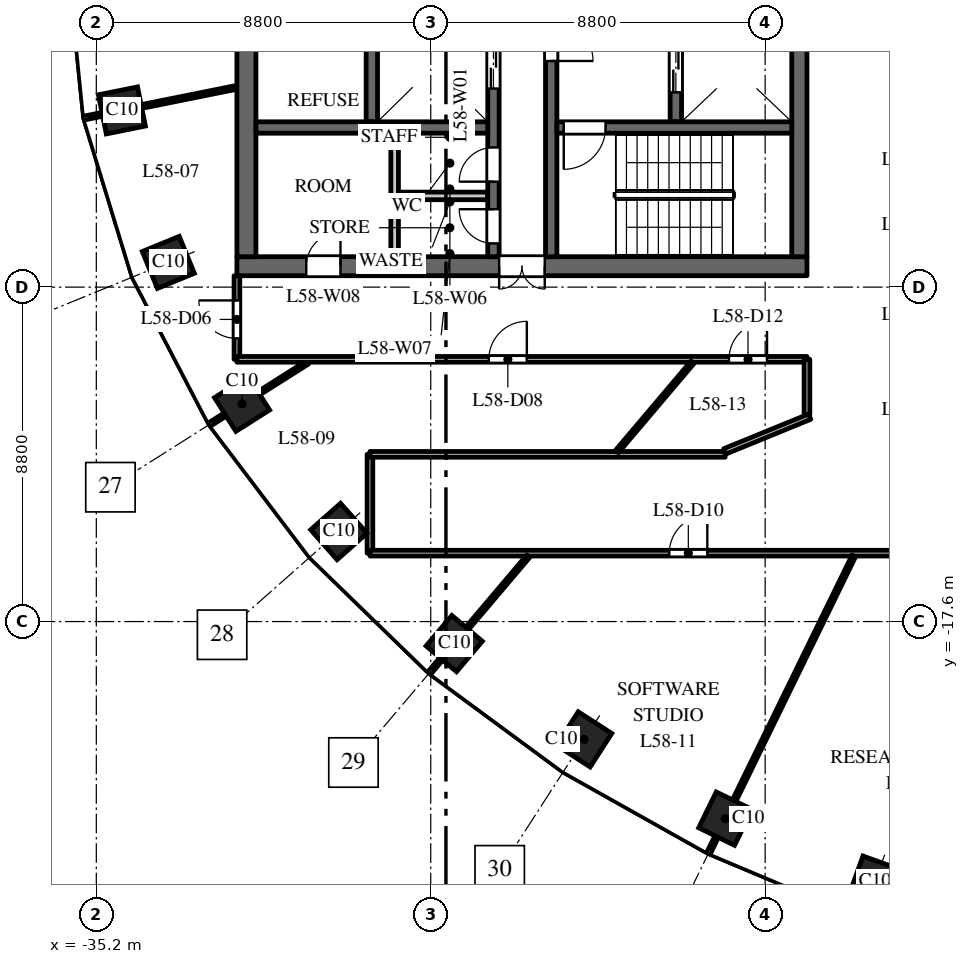
"""IFC4 building model, lengths in metres.
Left out: names, types, materials, properties, quantities, classifications, styles, units other than length and angle.
Written with IfcOpenShell. Run it as: python <this file> out.ifc"""

import sys

from ifc_helpers import new_model, si_unit, direction, frame, frame_2d, origin, origin_2d, place, context, subcontext, project, spatial, rectangle, extrude, element, fill, save


model = new_model("IFC4")
c1 = context("Model", 3, precision=1e-05, world=origin(), true_north=direction((0.0, 1.0)))
c2 = subcontext(c1, "Body", "Model", "MODEL_VIEW")
j1 = project(units=[si_unit("LENGTHUNIT", "METRE"), si_unit("PLANEANGLEUNIT", "RADIAN")], contexts=[c1])
p1 = place(None, origin())
s1 = spatial("IfcSite", under=j1, at=p1, CompositionType="ELEMENT")
p2 = place(p1, origin())
s2 = spatial("IfcBuilding", under=s1, at=p2, CompositionType="ELEMENT")
p3 = place(p2, frame((0.0, 0.0, 273.5)))
s3 = spatial("IfcBuildingStorey", under=s2, at=p3, CompositionType="ELEMENT", Elevation=273.5)
for number, where, z_axis, x_axis in (
    (1, (-34.527, -4.151, 0.0), (0.0, 0.0, 1.0), (0.197, -0.98, 0.0)),
    (2, (-33.305, -8.149, 0.0), (0.0, 0.0, 1.0), (0.379, -0.925, 0.0)),
    (3, (-31.365, -11.871, 0.0), (0.0, 0.0, 1.0), (0.535, -0.845, 0.0)),
    (4, (-28.819, -15.23, 0.0), (0.0, 0.0, 1.0), (0.663, -0.749, 0.0)),
    (5, (-25.783, -18.18, 0.0), (0.0, 0.0, 1.0), (0.763, -0.646, 0.0)),
    (6, (-22.362, -20.7, 0.0), (0.0, 0.0, 1.0), (0.84, -0.542, 0.0)),
    (7, (-18.646, -22.785, 0.0), (0.0, 0.0, 1.0), (0.898, -0.439, 0.0)),
    (8, (-14.709, -24.441, 0.0), (0.0, 0.0, 1.0), (0.941, -0.338, 0.0)),
):
    element("IfcColumn", number, at=place(p3, frame(where, z_axis=z_axis, x_axis=x_axis)), inside=s3, PredefinedType="COLUMN", context=c2, shape_type="SweptSolid", body=[
        extrude(rectangle(XDim=1.05, YDim=1.05, at=origin_2d()), origin(), (0.0, 0.0, 1.0), 4.0),
    ])
p4 = place(p3, frame((-16.5, -8.25, 0.0), z_axis=(0.0, 0.0, 1.0), x_axis=(-1.0, 0.0, 0.0)))
e9 = element("IfcWall", 9, at=p4, inside=s3, PredefinedType="SHEAR", context=c2, shape_type="SweptSolid", body=[
    extrude(rectangle(XDim=15.0, YDim=0.5, at=frame_2d((7.5, 0.0))), origin(), (0.0, 0.0, 1.0), 3.7),
])
p5 = place(p4, frame((6.9, 0.0, 0.0)))
e10 = element("IfcOpeningElement", 10, at=p5, cuts=e9, PredefinedType="OPENING", context=c2, shape_type="SweptSolid", body=[
    extrude(rectangle(XDim=1.2, YDim=2.1, at=frame_2d((0.6, 1.05))), frame((0.0, 0.26, 0.0), z_axis=(0.0, -1.0, 0.0), x_axis=(1.0, 0.0, 0.0)), (0.0, 0.0, 1.0), 0.52),
])
p6 = place(p4, frame((12.275, 0.0, 0.0)))
e11 = element("IfcOpeningElement", 11, at=p6, cuts=e9, PredefinedType="OPENING", context=c2, shape_type="SweptSolid", body=[
    extrude(rectangle(XDim=0.9, YDim=2.1, at=frame_2d((0.45, 1.05))), frame((0.0, 0.26, 0.0), z_axis=(0.0, -1.0, 0.0), x_axis=(1.0, 0.0, 0.0)), (0.0, 0.0, 1.0), 0.52),
])
p7 = place(p3, frame((-27.95, -4.45, 0.0), z_axis=(0.0, 0.0, 1.0), x_axis=(0.0, 1.0, 0.0)))
e12 = element("IfcWall", 12, at=p7, inside=s3, PredefinedType="SHEAR", context=c2, shape_type="SweptSolid", body=[
    extrude(rectangle(XDim=8.9, YDim=0.3, at=frame_2d((4.45, 0.0))), origin(), (0.0, 0.0, 1.0), 3.7),
])
p8 = place(p3, frame((-19.95, -4.45, 0.0), z_axis=(0.0, 0.0, 1.0), x_axis=(0.0, 1.0, 0.0)))
e13 = element("IfcWall", 13, at=p8, inside=s3, PredefinedType="SHEAR", context=c2, shape_type="SweptSolid", body=[
    extrude(rectangle(XDim=8.9, YDim=0.3, at=frame_2d((4.45, 0.0))), origin(), (0.0, 0.0, 1.0), 3.7),
])
p9 = place(p8, frame((0.775, 0.0, 0.0)))
e14 = element("IfcOpeningElement", 14, at=p9, cuts=e13, PredefinedType="OPENING", context=c2, shape_type="SweptSolid", body=[
    extrude(rectangle(XDim=1.2, YDim=2.1, at=frame_2d((0.6, 1.05))), frame((0.0, 0.16, 0.0), z_axis=(0.0, -1.0, 0.0), x_axis=(1.0, 0.0, 0.0)), (0.0, 0.0, 1.0), 0.32),
])
p10 = place(p8, frame((7.25, 0.0, 0.0)))
e15 = element("IfcOpeningElement", 15, at=p10, cuts=e13, PredefinedType="OPENING", context=c2, shape_type="SweptSolid", body=[
    extrude(rectangle(XDim=1.1, YDim=2.1, at=frame_2d((0.55, 1.05))), frame((0.0, 0.16, 0.0), z_axis=(0.0, -1.0, 0.0), x_axis=(1.0, 0.0, 0.0)), (0.0, 0.0, 1.0), 0.32),
])
p11 = place(p3, frame((-24.75, -8.0, 0.0), z_axis=(0.0, 0.0, 1.0), x_axis=(0.0, 1.0, 0.0)))
e16 = element("IfcWall", 16, at=p11, inside=s3, PredefinedType="SHEAR", context=c2, shape_type="SweptSolid", body=[
    extrude(rectangle(XDim=16.0, YDim=0.3, at=frame_2d((8.0, 0.0))), origin(), (0.0, 0.0, 1.0), 3.7),
])
p12 = place(p11, frame((4.425, 0.0, 0.0)))
e17 = element("IfcOpeningElement", 17, at=p12, cuts=e16, PredefinedType="OPENING", context=c2, shape_type="SweptSolid", body=[
    extrude(rectangle(XDim=1.1, YDim=2.1, at=frame_2d((0.55, 1.05))), frame((0.0, 0.16, 0.0), z_axis=(0.0, -1.0, 0.0), x_axis=(1.0, 0.0, 0.0)), (0.0, 0.0, 1.0), 0.32),
])
p13 = place(p11, frame((7.45, 0.0, 0.0)))
e18 = element("IfcOpeningElement", 18, at=p13, cuts=e16, PredefinedType="OPENING", context=c2, shape_type="SweptSolid", body=[
    extrude(rectangle(XDim=1.1, YDim=2.1, at=frame_2d((0.55, 1.05))), frame((0.0, 0.16, 0.0), z_axis=(0.0, -1.0, 0.0), x_axis=(1.0, 0.0, 0.0)), (0.0, 0.0, 1.0), 0.32),
])
p14 = place(p11, frame((10.475, 0.0, 0.0)))
e19 = element("IfcOpeningElement", 19, at=p14, cuts=e16, PredefinedType="OPENING", context=c2, shape_type="SweptSolid", body=[
    extrude(rectangle(XDim=1.1, YDim=2.1, at=frame_2d((0.55, 1.05))), frame((0.0, 0.16, 0.0), z_axis=(0.0, -1.0, 0.0), x_axis=(1.0, 0.0, 0.0)), (0.0, 0.0, 1.0), 0.32),
])
p15 = place(p11, frame((13.75, 0.0, 0.0)))
e20 = element("IfcOpeningElement", 20, at=p15, cuts=e16, PredefinedType="OPENING", context=c2, shape_type="SweptSolid", body=[
    extrude(rectangle(XDim=0.9, YDim=2.1, at=frame_2d((0.45, 1.05))), frame((0.0, 0.16, 0.0), z_axis=(0.0, -1.0, 0.0), x_axis=(1.0, 0.0, 0.0)), (0.0, 0.0, 1.0), 0.32),
])
p16 = place(p11, frame((1.975, 0.0, 0.0)))
e21 = element("IfcOpeningElement", 21, at=p16, cuts=e16, PredefinedType="OPENING", context=c2, shape_type="SweptSolid", body=[
    extrude(rectangle(XDim=0.9, YDim=2.1, at=frame_2d((0.45, 1.05))), frame((0.0, 0.16, 0.0), z_axis=(0.0, -1.0, 0.0), x_axis=(1.0, 0.0, 0.0)), (0.0, 0.0, 1.0), 0.32),
])
p17 = place(p11, frame((0.35, 0.0, 0.0)))
e22 = element("IfcOpeningElement", 22, at=p17, cuts=e16, PredefinedType="OPENING", context=c2, shape_type="SweptSolid", body=[
    extrude(rectangle(XDim=0.9, YDim=2.1, at=frame_2d((0.45, 1.05))), frame((0.0, 0.16, 0.0), z_axis=(0.0, -1.0, 0.0), x_axis=(1.0, 0.0, 0.0)), (0.0, 0.0, 1.0), 0.32),
])
p18 = place(p3, frame((-16.7, -8.0, 0.0), z_axis=(0.0, 0.0, 1.0), x_axis=(0.0, 1.0, 0.0)))
e23 = element("IfcWall", 23, at=p18, inside=s3, PredefinedType="SHEAR", context=c2, shape_type="SweptSolid", body=[
    extrude(rectangle(XDim=16.0, YDim=0.4, at=frame_2d((8.0, 0.0))), origin(), (0.0, 0.0, 1.0), 3.7),
])
p19 = place(p3, frame((-31.25, -8.0, 0.0), z_axis=(0.0, 0.0, 1.0), x_axis=(0.0, 1.0, 0.0)))
e24 = element("IfcWall", 24, at=p19, inside=s3, PredefinedType="SHEAR", context=c2, shape_type="SweptSolid", body=[
    extrude(rectangle(XDim=16.0, YDim=0.5, at=frame_2d((8.0, 0.0))), origin(), (0.0, 0.0, 1.0), 3.7),
])
p20 = place(p3, frame((-27.35, -8.0, 0.0), z_axis=(0.0, 0.0, 1.0), x_axis=(0.0, 1.0, 0.0)))
e25 = element("IfcWall", 25, at=p20, inside=s3, PredefinedType="PARTITIONING", context=c2, shape_type="SweptSolid", body=[
    extrude(rectangle(XDim=3.25, YDim=0.2, at=frame_2d((1.625, 0.0))), origin(), (0.0, 0.0, 1.0), 3.7),
])
p21 = place(p3, frame((-24.9, -6.4, 0.0), z_axis=(0.0, 0.0, 1.0), x_axis=(-1.0, 0.0, 0.0)))
e26 = element("IfcWall", 26, at=p21, inside=s3, PredefinedType="PARTITIONING", context=c2, shape_type="SweptSolid", body=[
    extrude(rectangle(XDim=2.35, YDim=0.2, at=frame_2d((1.175, 0.0))), origin(), (0.0, 0.0, 1.0), 3.7),
])
p22 = place(p3, frame((-24.9, -4.6, 0.0), z_axis=(0.0, 0.0, 1.0), x_axis=(-1.0, 0.0, 0.0)))
e27 = element("IfcWall", 27, at=p22, inside=s3, PredefinedType="SHEAR", context=c2, shape_type="SweptSolid", body=[
    extrude(rectangle(XDim=6.1, YDim=0.3, at=frame_2d((3.05, 0.0))), origin(), (0.0, 0.0, 1.0), 3.7),
])
p23 = place(p3, frame((-23.23, -8.0, 0.0), z_axis=(0.0, 0.0, 1.0), x_axis=(0.0, 1.0, 0.0)))
e28 = element("IfcWall", 28, at=p23, inside=s3, PredefinedType="SHEAR", context=c2, shape_type="SweptSolid", body=[
    extrude(rectangle(XDim=7.875, YDim=0.3, at=frame_2d((3.938, 0.0))), origin(), (0.0, 0.0, 1.0), 3.7),
])
p24 = place(p23, frame((5.15, 0.0, 0.0)))
e29 = element("IfcOpeningElement", 29, at=p24, cuts=e28, PredefinedType="OPENING", context=c2, shape_type="SweptSolid", body=[
    extrude(rectangle(XDim=1.1, YDim=2.1, at=frame_2d((0.55, 1.05))), frame((0.0, 0.16, 0.0), z_axis=(0.0, -1.0, 0.0), x_axis=(1.0, 0.0, 0.0)), (0.0, 0.0, 1.0), 0.32),
])
p25 = place(p3, frame((-16.9, -4.6, 0.0), z_axis=(0.0, 0.0, 1.0), x_axis=(-1.0, 0.0, 0.0)))
e30 = element("IfcWall", 30, at=p25, inside=s3, PredefinedType="SHEAR", context=c2, shape_type="SweptSolid", body=[
    extrude(rectangle(XDim=6.18, YDim=0.3, at=frame_2d((3.09, 0.0))), origin(), (0.0, 0.0, 1.0), 3.7),
])
p26 = place(p25, frame((4.9, 0.0, 0.0)))
e31 = element("IfcOpeningElement", 31, at=p26, cuts=e30, PredefinedType="OPENING", context=c2, shape_type="SweptSolid", body=[
    extrude(rectangle(XDim=1.1, YDim=2.1, at=frame_2d((0.55, 1.05))), frame((0.0, 0.16, 0.0), z_axis=(0.0, -1.0, 0.0), x_axis=(1.0, 0.0, 0.0)), (0.0, 0.0, 1.0), 0.32),
])
p27 = place(p3, frame((-35.512, -4.349, 0.0), z_axis=(0.0, 0.0, 1.0), x_axis=(0.980357474535, 0.197228857227, 0.0)))
e32 = element("IfcWall", 32, at=p27, inside=s3, PredefinedType="PARTITIONING", context=c2, shape_type="SweptSolid", body=[
    extrude(rectangle(XDim=4.092, YDim=0.1, at=frame_2d((2.046, 0.0))), origin(), (0.0, 0.0, 1.0), 3.2),
])
p28 = place(p3, frame((-32.212, -12.408, 0.0), z_axis=(0.0, 0.0, 1.0), x_axis=(0.844810627195, 0.535065420467, 0.0)))
e33 = element("IfcWall", 33, at=p28, inside=s3, PredefinedType="PARTITIONING", context=c2, shape_type="SweptSolid", body=[
    extrude(rectangle(XDim=3.048, YDim=0.1, at=frame_2d((1.524, 0.0))), origin(), (0.0, 0.0, 1.0), 3.7),
])
p29 = place(p3, frame((-31.5, -10.7, 0.0), z_axis=(0.0, 0.0, 1.0), x_axis=(0.0, 1.0, 0.0)))
e34 = element("IfcWall", 34, at=p29, inside=s3, PredefinedType="PARTITIONING", context=c2, shape_type="SweptSolid", body=[
    extrude(rectangle(XDim=2.2, YDim=0.15, at=frame_2d((1.1, 0.0))), origin(), (0.0, 0.0, 1.0), 3.7),
])
p30 = place(p29, frame((0.55, 0.0, 0.0)))
e35 = element("IfcOpeningElement", 35, at=p30, cuts=e34, PredefinedType="OPENING", context=c2, shape_type="SweptSolid", body=[
    extrude(rectangle(XDim=1.0, YDim=2.1, at=frame_2d((0.5, 1.05))), frame((0.0, 0.085, 0.0), z_axis=(0.0, -1.0, 0.0), x_axis=(1.0, 0.0, 0.0)), (0.0, 0.0, 1.0), 0.17),
])
p31 = place(p3, frame((-31.5, -10.7, 0.0), z_axis=(0.0, 0.0, 1.0), x_axis=(1.0, 0.0, 0.0)))
e36 = element("IfcWall", 36, at=p31, inside=s3, PredefinedType="PARTITIONING", context=c2, shape_type="SweptSolid", body=[
    extrude(rectangle(XDim=15.0, YDim=0.15, at=frame_2d((7.5, 0.0))), origin(), (0.0, 0.0, 1.0), 3.1),
])
p32 = place(p31, frame((6.629, 0.0, 0.0)))
e37 = element("IfcOpeningElement", 37, at=p32, cuts=e36, PredefinedType="OPENING", context=c2, shape_type="SweptSolid", body=[
    extrude(rectangle(XDim=1.0, YDim=2.1, at=frame_2d((0.5, 1.05))), frame((0.0, 0.085, 0.0), z_axis=(0.0, -1.0, 0.0), x_axis=(1.0, 0.0, 0.0)), (0.0, 0.0, 1.0), 0.17),
])
p33 = place(p31, frame((12.949, 0.0, 0.0)))
e38 = element("IfcOpeningElement", 38, at=p33, cuts=e36, PredefinedType="OPENING", context=c2, shape_type="SweptSolid", body=[
    extrude(rectangle(XDim=1.0, YDim=2.1, at=frame_2d((0.5, 1.05))), frame((0.0, 0.085, 0.0), z_axis=(0.0, -1.0, 0.0), x_axis=(1.0, 0.0, 0.0)), (0.0, 0.0, 1.0), 0.17),
])
p34 = place(p3, frame((-28.0, -15.8, 0.0), z_axis=(0.0, 0.0, 1.0), x_axis=(0.0, 1.0, 0.0)))
e39 = element("IfcWall", 39, at=p34, inside=s3, PredefinedType="PARTITIONING", context=c2, shape_type="SweptSolid", body=[
    extrude(rectangle(XDim=2.6, YDim=0.15, at=frame_2d((1.3, 0.0))), origin(), (0.0, 0.0, 1.0), 3.0),
])
p35 = place(p3, frame((-28.0, -15.8, 0.0), z_axis=(0.0, 0.0, 1.0), x_axis=(1.0, 0.0, 0.0)))
e40 = element("IfcWall", 40, at=p35, inside=s3, PredefinedType="PARTITIONING", context=c2, shape_type="SweptSolid", body=[
    extrude(rectangle(XDim=19.809, YDim=0.15, at=frame_2d((9.905, 0.0))), origin(), (0.0, 0.0, 1.0), 2.75),
])
p36 = place(p35, frame((7.878, 0.0, 0.0)))
e41 = element("IfcOpeningElement", 41, at=p36, cuts=e40, PredefinedType="OPENING", context=c2, shape_type="SweptSolid", body=[
    extrude(rectangle(XDim=1.0, YDim=2.1, at=frame_2d((0.5, 1.05))), frame((0.0, 0.085, 0.0), z_axis=(0.0, -1.0, 0.0), x_axis=(1.0, 0.0, 0.0)), (0.0, 0.0, 1.0), 0.17),
])
p37 = place(p35, frame((15.66, 0.0, 0.0)))
e42 = element("IfcOpeningElement", 42, at=p37, cuts=e40, PredefinedType="OPENING", context=c2, shape_type="SweptSolid", body=[
    extrude(rectangle(XDim=1.0, YDim=2.1, at=frame_2d((0.5, 1.05))), frame((0.0, 0.085, 0.0), z_axis=(0.0, -1.0, 0.0), x_axis=(1.0, 0.0, 0.0)), (0.0, 0.0, 1.0), 0.17),
])
p38 = place(p3, frame((-28.0, -13.2, 0.0), z_axis=(0.0, 0.0, 1.0), x_axis=(1.0, 0.0, 0.0)))
e43 = element("IfcWall", 43, at=p38, inside=s3, PredefinedType="PARTITIONING", context=c2, shape_type="SweptSolid", body=[
    extrude(rectangle(XDim=9.347, YDim=0.15, at=frame_2d((4.673, 0.0))), origin(), (0.0, 0.0, 1.0), 2.75),
])
p39 = place(p3, frame((-26.43, -18.945, 0.0), z_axis=(0.0, 0.0, 1.0), x_axis=(0.646323350317, 0.763063645337, 0.0)))
e44 = element("IfcWall", 44, at=p39, inside=s3, PredefinedType="PARTITIONING", context=c2, shape_type="SweptSolid", body=[
    extrude(rectangle(XDim=4.02, YDim=0.1, at=frame_2d((2.01, 0.0))), origin(), (0.0, 0.0, 1.0), 2.75),
])
p40 = place(p3, frame((-21.499, -13.125, 0.0), z_axis=(0.0, 0.0, 1.0), x_axis=(0.646354899778, 0.763036921474, 0.0)))
e45 = element("IfcWall", 45, at=p40, inside=s3, PredefinedType="PARTITIONING", context=c2, shape_type="SweptSolid", body=[
    extrude(rectangle(XDim=3.076, YDim=0.1, at=frame_2d((1.538, 0.0))), origin(), (0.0, 0.0, 1.0), 3.7),
])
p41 = place(p3, frame((-19.086, -23.685, 0.0), z_axis=(0.0, 0.0, 1.0), x_axis=(0.439174872977, 0.898401597809, 0.0)))
e46 = element("IfcWall", 46, at=p41, inside=s3, PredefinedType="PARTITIONING", context=c2, shape_type="SweptSolid", body=[
    extrude(rectangle(XDim=8.693, YDim=0.1, at=frame_2d((4.347, 0.0))), origin(), (0.0, 0.0, 1.0), 2.85),
])
p42 = place(p3, frame((-18.664, -13.123, 0.0), z_axis=(0.0, 0.0, 1.0), x_axis=(0.925590432986, 0.378526551731, 0.0)))
e47 = element("IfcWall", 47, at=p42, inside=s3, PredefinedType="PARTITIONING", context=c2, shape_type="SweptSolid", body=[
    extrude(rectangle(XDim=2.415, YDim=0.15, at=frame_2d((1.208, 0.0))), origin(), (0.0, 0.0, 1.0), 2.75),
])
p43 = place(p3, frame((-16.5, -12.157, 0.0), z_axis=(0.0, 0.0, 1.0), x_axis=(0.0, 1.0, 0.0)))
e48 = element("IfcWall", 48, at=p43, inside=s3, PredefinedType="PARTITIONING", context=c2, shape_type="SweptSolid", body=[
    extrude(rectangle(XDim=1.457, YDim=0.15, at=frame_2d((0.729, 0.0))), origin(), (0.0, 0.0, 1.0), 2.75),
])
p44 = place(p9, origin())
e49 = element("IfcDoor", 49, at=p44, inside=s3, OperationType="DOUBLE_DOOR_SLIDING", PredefinedType="DOOR", context=c2, shape_type="SweptSolid", body=[
    extrude(rectangle(XDim=1.2, YDim=2.1, at=frame_2d((0.6, 1.05))), frame((0.0, 0.025, 0.0), z_axis=(0.0, -1.0, 0.0), x_axis=(1.0, 0.0, 0.0)), (0.0, 0.0, 1.0), 0.05),
])
fill(e14, e49)
p45 = place(p12, origin())
e50 = element("IfcDoor", 50, at=p45, inside=s3, OperationType="DOUBLE_DOOR_SLIDING", PredefinedType="DOOR", context=c2, shape_type="SweptSolid", body=[
    extrude(rectangle(XDim=1.1, YDim=2.1, at=frame_2d((0.55, 1.05))), frame((0.0, 0.025, 0.0), z_axis=(0.0, -1.0, 0.0), x_axis=(1.0, 0.0, 0.0)), (0.0, 0.0, 1.0), 0.05),
])
fill(e17, e50)
p46 = place(p26, origin())
e51 = element("IfcDoor", 51, at=p46, inside=s3, OperationType="SINGLE_SWING_LEFT", PredefinedType="DOOR", context=c2, shape_type="SweptSolid", body=[
    extrude(rectangle(XDim=1.1, YDim=2.1, at=frame_2d((0.55, 1.05))), frame((0.0, 0.025, 0.0), z_axis=(0.0, -1.0, 0.0), x_axis=(1.0, 0.0, 0.0)), (0.0, 0.0, 1.0), 0.05),
])
fill(e31, e51)
p47 = place(p24, origin())
e52 = element("IfcDoor", 52, at=p47, inside=s3, OperationType="SINGLE_SWING_LEFT", PredefinedType="DOOR", context=c2, shape_type="SweptSolid", body=[
    extrude(rectangle(XDim=1.1, YDim=2.1, at=frame_2d((0.55, 1.05))), frame((0.0, 0.025, 0.0), z_axis=(0.0, -1.0, 0.0), x_axis=(1.0, 0.0, 0.0)), (0.0, 0.0, 1.0), 0.05),
])
fill(e29, e52)
p48 = place(p5, origin())
e53 = element("IfcDoor", 53, at=p48, inside=s3, OperationType="DOUBLE_DOOR_DOUBLE_SWING", PredefinedType="DOOR", context=c2, shape_type="SweptSolid", body=[
    extrude(rectangle(XDim=1.2, YDim=2.1, at=frame_2d((0.6, 1.05))), frame((0.0, 0.025, 0.0), z_axis=(0.0, -1.0, 0.0), x_axis=(1.0, 0.0, 0.0)), (0.0, 0.0, 1.0), 0.05),
])
fill(e10, e53)
p49 = place(p16, origin())
e54 = element("IfcDoor", 54, at=p49, inside=s3, OperationType="SINGLE_SWING_RIGHT", PredefinedType="DOOR", context=c2, shape_type="SweptSolid", body=[
    extrude(rectangle(XDim=0.9, YDim=2.1, at=frame_2d((0.45, 1.05))), frame((0.0, 0.025, 0.0), z_axis=(0.0, -1.0, 0.0), x_axis=(1.0, 0.0, 0.0)), (0.0, 0.0, 1.0), 0.05),
])
fill(e21, e54)
p50 = place(p17, origin())
e55 = element("IfcDoor", 55, at=p50, inside=s3, OperationType="SINGLE_SWING_LEFT", PredefinedType="DOOR", context=c2, shape_type="SweptSolid", body=[
    extrude(rectangle(XDim=0.9, YDim=2.1, at=frame_2d((0.45, 1.05))), frame((0.0, 0.025, 0.0), z_axis=(0.0, -1.0, 0.0), x_axis=(1.0, 0.0, 0.0)), (0.0, 0.0, 1.0), 0.05),
])
fill(e22, e55)
p51 = place(p6, origin())
e56 = element("IfcDoor", 56, at=p51, inside=s3, OperationType="SINGLE_SWING_LEFT", PredefinedType="DOOR", context=c2, shape_type="SweptSolid", body=[
    extrude(rectangle(XDim=0.9, YDim=2.1, at=frame_2d((0.45, 1.05))), frame((0.0, 0.025, 0.0), z_axis=(0.0, -1.0, 0.0), x_axis=(1.0, 0.0, 0.0)), (0.0, 0.0, 1.0), 0.05),
])
fill(e11, e56)
p52 = place(p30, origin())
e57 = element("IfcDoor", 57, at=p52, inside=s3, OperationType="SINGLE_SWING_RIGHT", PredefinedType="DOOR", context=c2, shape_type="SweptSolid", body=[
    extrude(rectangle(XDim=1.0, YDim=2.1, at=frame_2d((0.5, 1.05))), frame((0.0, 0.025, 0.0), z_axis=(0.0, -1.0, 0.0), x_axis=(1.0, 0.0, 0.0)), (0.0, 0.0, 1.0), 0.05),
])
fill(e35, e57)
p53 = place(p32, origin())
e58 = element("IfcDoor", 58, at=p53, inside=s3, OperationType="SINGLE_SWING_RIGHT", PredefinedType="DOOR", context=c2, shape_type="SweptSolid", body=[
    extrude(rectangle(XDim=1.0, YDim=2.1, at=frame_2d((0.5, 1.05))), frame((0.0, 0.025, 0.0), z_axis=(0.0, -1.0, 0.0), x_axis=(1.0, 0.0, 0.0)), (0.0, 0.0, 1.0), 0.05),
])
fill(e37, e58)
p54 = place(p36, origin())
e59 = element("IfcDoor", 59, at=p54, inside=s3, OperationType="SINGLE_SWING_RIGHT", PredefinedType="DOOR", context=c2, shape_type="SweptSolid", body=[
    extrude(rectangle(XDim=1.0, YDim=2.1, at=frame_2d((0.5, 1.05))), frame((0.0, 0.025, 0.0), z_axis=(0.0, -1.0, 0.0), x_axis=(1.0, 0.0, 0.0)), (0.0, 0.0, 1.0), 0.05),
])
fill(e41, e59)
p55 = place(p33, origin())
e60 = element("IfcDoor", 60, at=p55, inside=s3, OperationType="SINGLE_SWING_RIGHT", PredefinedType="DOOR", context=c2, shape_type="SweptSolid", body=[
    extrude(rectangle(XDim=1.0, YDim=2.1, at=frame_2d((0.5, 1.05))), frame((0.0, 0.025, 0.0), z_axis=(0.0, -1.0, 0.0), x_axis=(1.0, 0.0, 0.0)), (0.0, 0.0, 1.0), 0.05),
])
fill(e38, e60)
save(model, sys.argv[1])
